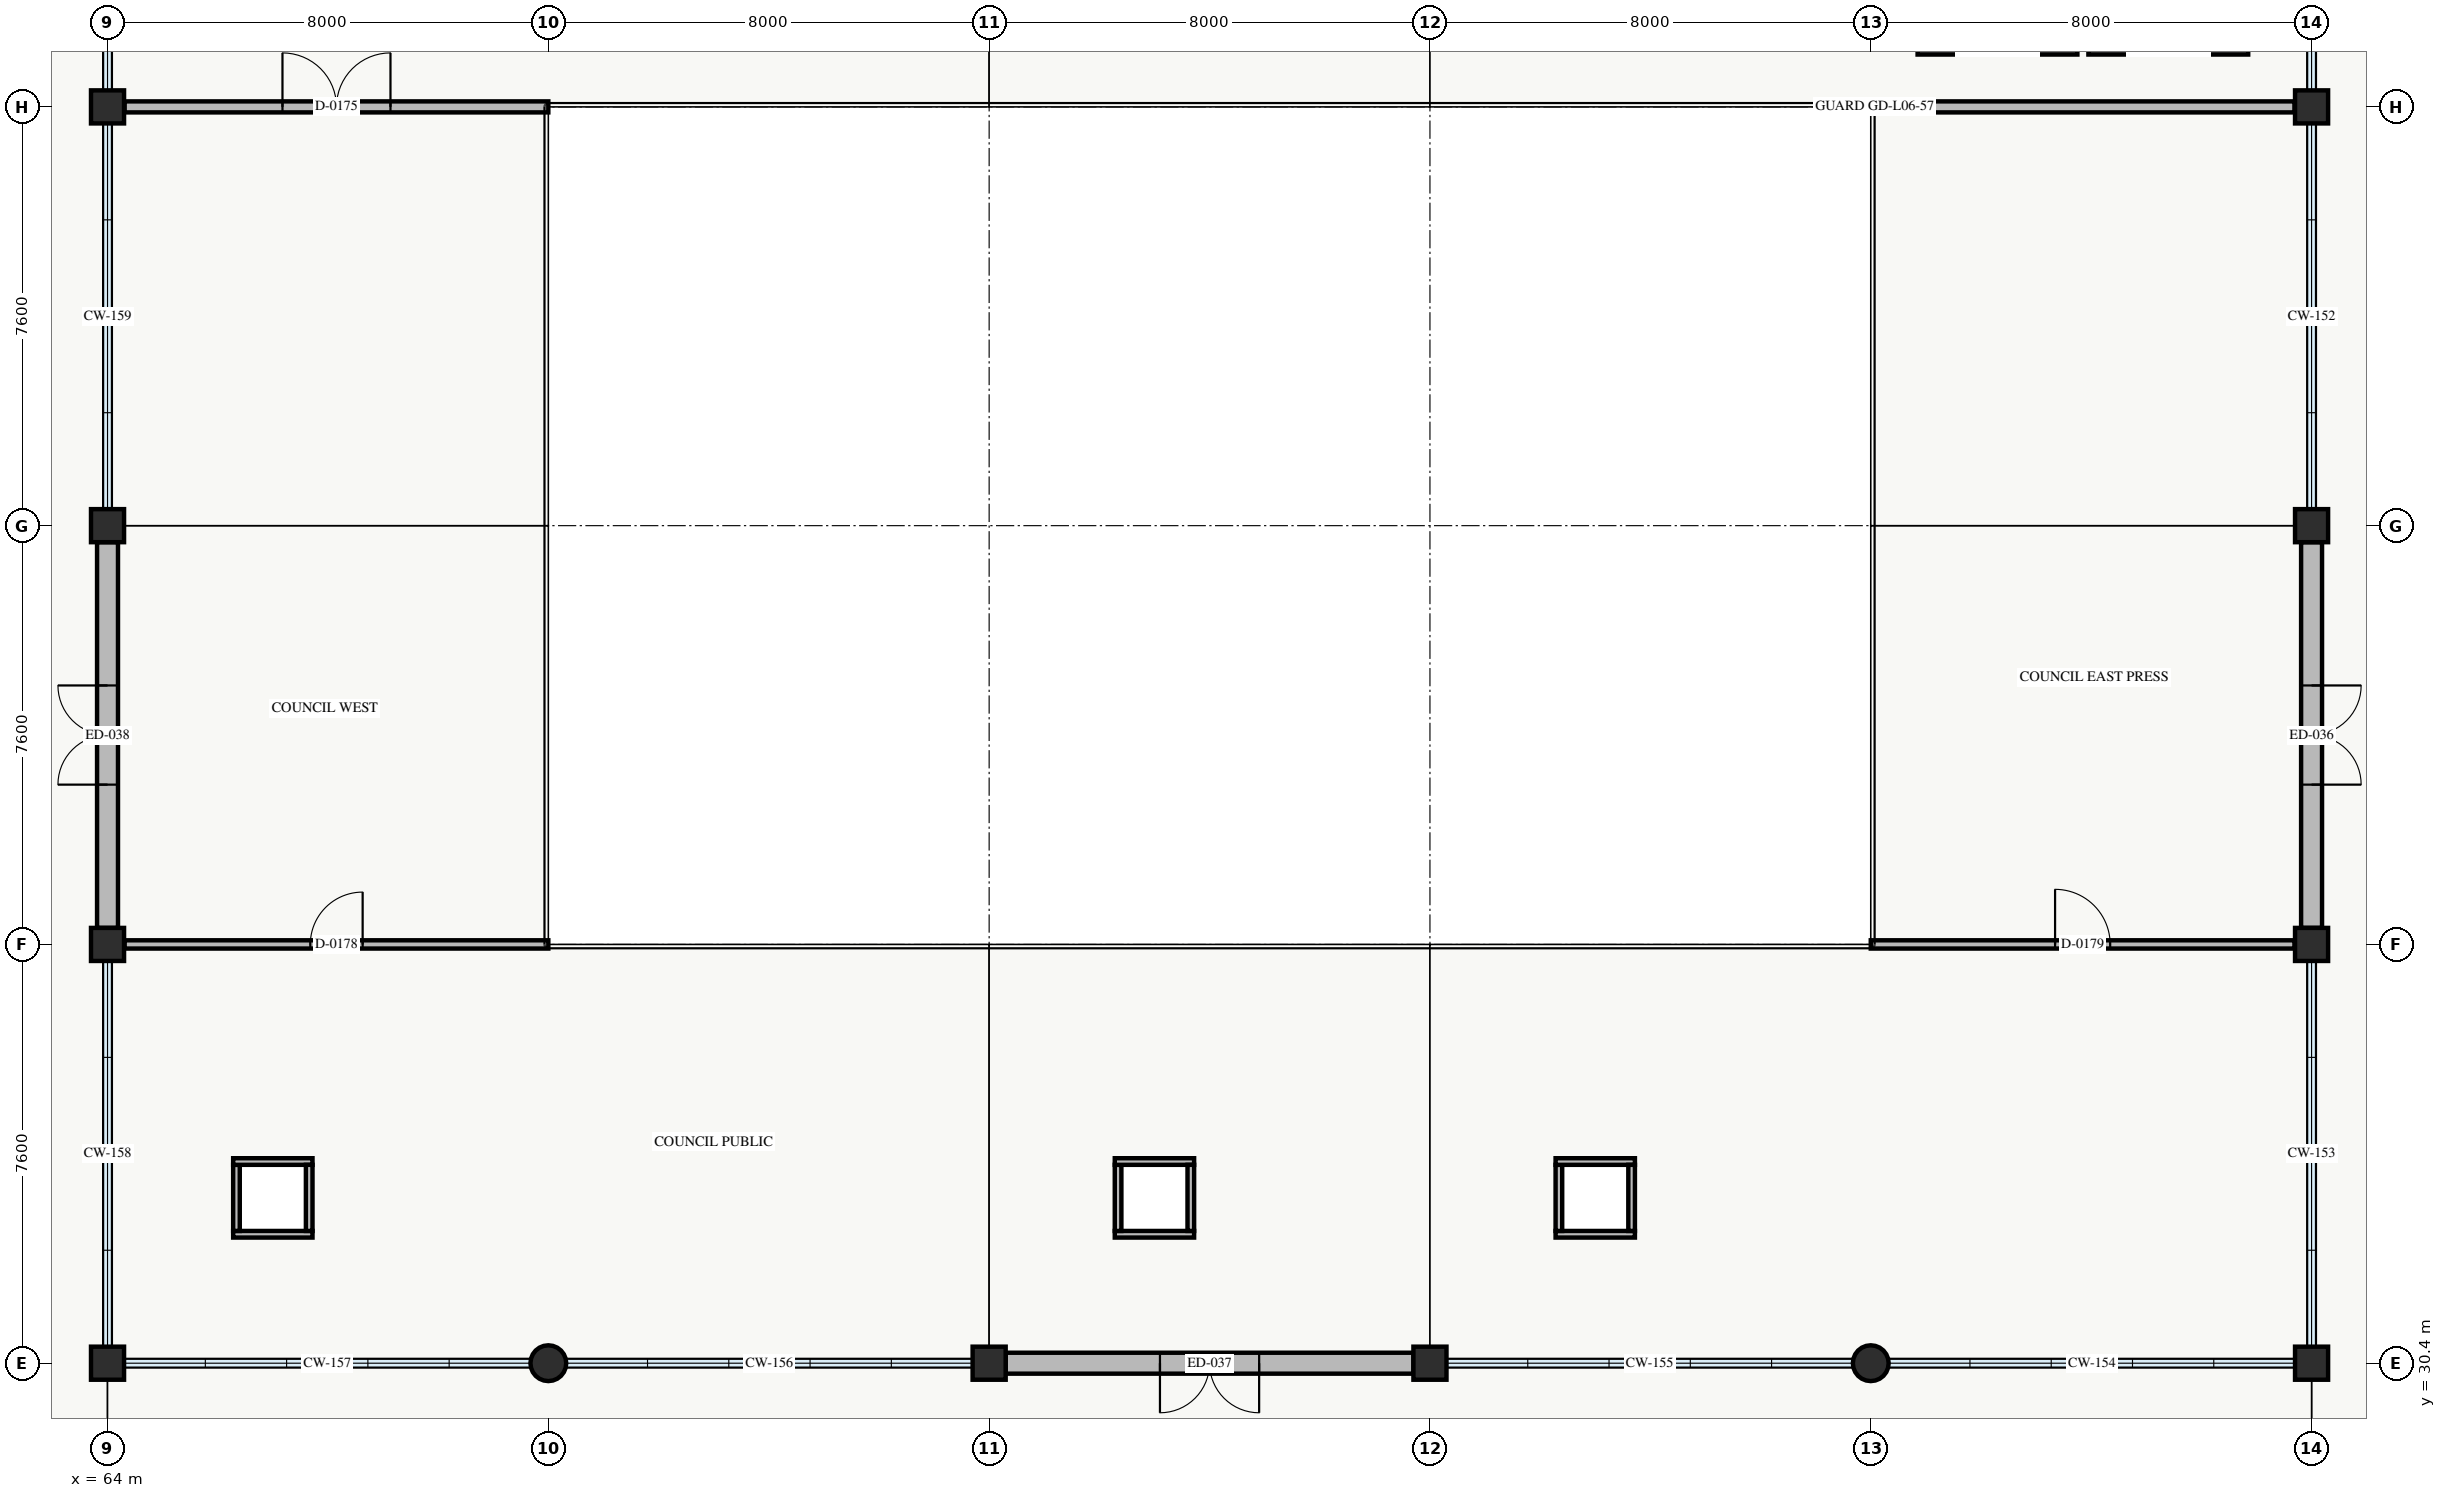
"""IFC4 building model, lengths in metres.
Left out: names, types, materials, properties, quantities, classifications, styles, units other than length and angle.
Written with IfcOpenShell. Run it as: python <this file> out.ifc"""

import sys

from ifc_helpers import new_model, si_unit, direction, frame, frame_2d, origin, origin_2d, place, context, subcontext, project, spatial, rectangle, circle, extrude, element, fill, save


model = new_model("IFC4")
c1 = context("Model", 3, precision=1e-05, world=origin(), true_north=direction((0.0, 1.0)))
c2 = subcontext(c1, "Body", "Model", "MODEL_VIEW")
j1 = project(units=[si_unit("LENGTHUNIT", "METRE"), si_unit("PLANEANGLEUNIT", "RADIAN")], contexts=[c1])
p1 = place(None, origin())
s1 = spatial("IfcSite", under=j1, at=p1, CompositionType="ELEMENT")
p2 = place(p1, origin())
s2 = spatial("IfcBuilding", under=s1, at=p2, CompositionType="ELEMENT")
p3 = place(p2, frame((0.0, 0.0, 23.7)))
s3 = spatial("IfcBuildingStorey", under=s2, at=p3, CompositionType="ELEMENT", Elevation=23.7)
for number, where, z_axis, x_axis in (
    (1, (64.0, 30.4, 0.0), (0.0, 0.0, 1.0), (1.0, 0.0, 0.0)),
    (2, (64.0, 38.0, 0.0), (0.0, 0.0, 1.0), (1.0, 0.0, 0.0)),
    (3, (64.0, 45.6, 0.0), (0.0, 0.0, 1.0), (1.0, 0.0, 0.0)),
    (4, (64.0, 53.2, 0.0), (0.0, 0.0, 1.0), (1.0, 0.0, 0.0)),
):
    element("IfcColumn", number, at=place(p3, frame(where, z_axis=z_axis, x_axis=x_axis)), inside=s3, PredefinedType="COLUMN", context=c2, shape_type="SweptSolid", body=[
        extrude(rectangle(XDim=0.6, YDim=0.6, at=origin_2d()), origin(), (0.0, 0.0, 1.0), 4.8),
    ])
p4 = place(p3, frame((72.0, 30.4, 0.0), z_axis=(0.0, 0.0, 1.0), x_axis=(1.0, 0.0, 0.0)))
e5 = element("IfcColumn", 5, at=p4, inside=s3, PredefinedType="COLUMN", context=c2, shape_type="SweptSolid", body=[
    extrude(circle(Radius=0.325, at=origin_2d()), origin(), (0.0, 0.0, 1.0), 4.8),
])
for number, where, z_axis, x_axis in (
    (6, (80.0, 30.4, 0.0), (0.0, 0.0, 1.0), (1.0, 0.0, 0.0)),
    (7, (88.0, 30.4, 0.0), (0.0, 0.0, 1.0), (1.0, 0.0, 0.0)),
):
    element("IfcColumn", number, at=place(p3, frame(where, z_axis=z_axis, x_axis=x_axis)), inside=s3, PredefinedType="COLUMN", context=c2, shape_type="SweptSolid", body=[
        extrude(rectangle(XDim=0.6, YDim=0.6, at=origin_2d()), origin(), (0.0, 0.0, 1.0), 4.8),
    ])
p5 = place(p3, frame((96.0, 30.4, 0.0), z_axis=(0.0, 0.0, 1.0), x_axis=(1.0, 0.0, 0.0)))
e8 = element("IfcColumn", 8, at=p5, inside=s3, PredefinedType="COLUMN", context=c2, shape_type="SweptSolid", body=[
    extrude(circle(Radius=0.325, at=origin_2d()), origin(), (0.0, 0.0, 1.0), 4.8),
])
for number, where, z_axis, x_axis in (
    (9, (104.0, 30.4, 0.0), (0.0, 0.0, 1.0), (1.0, 0.0, 0.0)),
    (10, (104.0, 38.0, 0.0), (0.0, 0.0, 1.0), (1.0, 0.0, 0.0)),
    (11, (104.0, 45.6, 0.0), (0.0, 0.0, 1.0), (1.0, 0.0, 0.0)),
    (12, (104.0, 53.2, 0.0), (0.0, 0.0, 1.0), (1.0, 0.0, 0.0)),
):
    element("IfcColumn", number, at=place(p3, frame(where, z_axis=z_axis, x_axis=x_axis)), inside=s3, PredefinedType="COLUMN", context=c2, shape_type="SweptSolid", body=[
        extrude(rectangle(XDim=0.6, YDim=0.6, at=origin_2d()), origin(), (0.0, 0.0, 1.0), 4.8),
    ])
p6 = place(p3, frame((104.0, 45.3, 0.0), z_axis=(0.0, 0.0, 1.0), x_axis=(0.0, -1.0, 0.0)))
e13 = element("IfcWall", 13, at=p6, inside=s3, PredefinedType="STANDARD", context=c2, shape_type="SweptSolid", body=[
    extrude(rectangle(XDim=7.0, YDim=0.38, at=frame_2d((3.5, 0.0))), origin(), (0.0, 0.0, 1.0), 4.03),
])
p7 = place(p6, frame((2.6, 0.0, 0.0)))
e14 = element("IfcOpeningElement", 14, at=p7, cuts=e13, PredefinedType="OPENING", context=c2, shape_type="SweptSolid", body=[
    extrude(rectangle(XDim=1.8, YDim=2.4, at=frame_2d((0.9, 1.2))), frame((0.0, 0.2, 0.0), z_axis=(0.0, -1.0, 0.0), x_axis=(1.0, 0.0, 0.0)), (0.0, 0.0, 1.0), 0.4),
])
p8 = place(p3, frame((87.7, 30.4, 0.0), z_axis=(0.0, 0.0, 1.0), x_axis=(-1.0, 0.0, 0.0)))
e15 = element("IfcWall", 15, at=p8, inside=s3, PredefinedType="STANDARD", context=c2, shape_type="SweptSolid", body=[
    extrude(rectangle(XDim=7.4, YDim=0.38, at=frame_2d((3.7, 0.0))), origin(), (0.0, 0.0, 1.0), 3.98),
])
p9 = place(p8, frame((2.8, 0.0, 0.0)))
e16 = element("IfcOpeningElement", 16, at=p9, cuts=e15, PredefinedType="OPENING", context=c2, shape_type="SweptSolid", body=[
    extrude(rectangle(XDim=1.8, YDim=2.4, at=frame_2d((0.9, 1.2))), frame((0.0, 0.2, 0.0), z_axis=(0.0, -1.0, 0.0), x_axis=(1.0, 0.0, 0.0)), (0.0, 0.0, 1.0), 0.4),
])
p10 = place(p3, frame((64.0, 38.3, 0.0), z_axis=(0.0, 0.0, 1.0), x_axis=(0.0, 1.0, 0.0)))
e17 = element("IfcWall", 17, at=p10, inside=s3, PredefinedType="STANDARD", context=c2, shape_type="SweptSolid", body=[
    extrude(rectangle(XDim=7.0, YDim=0.38, at=frame_2d((3.5, 0.0))), origin(), (0.0, 0.0, 1.0), 4.03),
])
p11 = place(p10, frame((2.6, 0.0, 0.0)))
e18 = element("IfcOpeningElement", 18, at=p11, cuts=e17, PredefinedType="OPENING", context=c2, shape_type="SweptSolid", body=[
    extrude(rectangle(XDim=1.8, YDim=2.4, at=frame_2d((0.9, 1.2))), frame((0.0, 0.2, 0.0), z_axis=(0.0, -1.0, 0.0), x_axis=(1.0, 0.0, 0.0)), (0.0, 0.0, 1.0), 0.4),
])
p12 = place(p3, frame((99.75, 54.275, 0.0), z_axis=(0.0, 0.0, 1.0), x_axis=(-1.0, 0.0, 0.0)))
e19 = element("IfcWall", 19, at=p12, inside=s3, PredefinedType="SHEAR", context=c2, shape_type="SweptSolid", body=[
    extrude(rectangle(XDim=2.9, YDim=0.25, at=frame_2d((1.45, 0.0))), origin(), (0.0, 0.0, 1.0), 4.58),
])
p13 = place(p12, frame((0.9, 0.0, 0.0)))
e20 = element("IfcOpeningElement", 20, at=p13, cuts=e19, PredefinedType="OPENING", context=c2, shape_type="SweptSolid", body=[
    extrude(rectangle(XDim=1.1, YDim=2.15, at=frame_2d((0.55, 1.075))), frame((0.0, 0.135, 0.0), z_axis=(0.0, -1.0, 0.0), x_axis=(1.0, 0.0, 0.0)), (0.0, 0.0, 1.0), 0.27),
])
p14 = place(p3, frame((102.85, 54.275, 0.0), z_axis=(0.0, 0.0, 1.0), x_axis=(-1.0, 0.0, 0.0)))
e21 = element("IfcWall", 21, at=p14, inside=s3, PredefinedType="SHEAR", context=c2, shape_type="SweptSolid", body=[
    extrude(rectangle(XDim=2.9, YDim=0.25, at=frame_2d((1.45, 0.0))), origin(), (0.0, 0.0, 1.0), 4.58),
])
p15 = place(p14, frame((0.9, 0.0, 0.0)))
e22 = element("IfcOpeningElement", 22, at=p15, cuts=e21, PredefinedType="OPENING", context=c2, shape_type="SweptSolid", body=[
    extrude(rectangle(XDim=1.1, YDim=2.15, at=frame_2d((0.55, 1.075))), frame((0.0, 0.135, 0.0), z_axis=(0.0, -1.0, 0.0), x_axis=(1.0, 0.0, 0.0)), (0.0, 0.0, 1.0), 0.27),
])
p16 = place(p3, frame((67.72, 32.74, 0.0), z_axis=(0.0, 0.0, 1.0), x_axis=(-1.0, 0.0, 0.0)))
e23 = element("IfcWall", 23, at=p16, inside=s3, PredefinedType="PARTITIONING", context=c2, shape_type="SweptSolid", body=[
    extrude(rectangle(XDim=1.44, YDim=0.12, at=frame_2d((0.72, 0.0))), origin(), (0.0, 0.0, 1.0), 4.58),
])
p17 = place(p3, frame((66.34, 32.8, 0.0), z_axis=(0.0, 0.0, 1.0), x_axis=(0.0, 1.0, 0.0)))
e24 = element("IfcWall", 24, at=p17, inside=s3, PredefinedType="PARTITIONING", context=c2, shape_type="SweptSolid", body=[
    extrude(rectangle(XDim=1.2, YDim=0.12, at=frame_2d((0.6, 0.0))), origin(), (0.0, 0.0, 1.0), 4.58),
])
p18 = place(p3, frame((66.28, 34.06, 0.0), z_axis=(0.0, 0.0, 1.0), x_axis=(1.0, 0.0, 0.0)))
e25 = element("IfcWall", 25, at=p18, inside=s3, PredefinedType="PARTITIONING", context=c2, shape_type="SweptSolid", body=[
    extrude(rectangle(XDim=1.44, YDim=0.12, at=frame_2d((0.72, 0.0))), origin(), (0.0, 0.0, 1.0), 4.58),
])
p19 = place(p3, frame((67.66, 34.0, 0.0), z_axis=(0.0, 0.0, 1.0), x_axis=(0.0, -1.0, 0.0)))
e26 = element("IfcWall", 26, at=p19, inside=s3, PredefinedType="PARTITIONING", context=c2, shape_type="SweptSolid", body=[
    extrude(rectangle(XDim=1.2, YDim=0.12, at=frame_2d((0.6, 0.0))), origin(), (0.0, 0.0, 1.0), 4.58),
])
p20 = place(p3, frame((83.72, 32.74, 0.0), z_axis=(0.0, 0.0, 1.0), x_axis=(-1.0, 0.0, 0.0)))
e27 = element("IfcWall", 27, at=p20, inside=s3, PredefinedType="PARTITIONING", context=c2, shape_type="SweptSolid", body=[
    extrude(rectangle(XDim=1.44, YDim=0.12, at=frame_2d((0.72, 0.0))), origin(), (0.0, 0.0, 1.0), 4.58),
])
p21 = place(p3, frame((82.34, 32.8, 0.0), z_axis=(0.0, 0.0, 1.0), x_axis=(0.0, 1.0, 0.0)))
e28 = element("IfcWall", 28, at=p21, inside=s3, PredefinedType="PARTITIONING", context=c2, shape_type="SweptSolid", body=[
    extrude(rectangle(XDim=1.2, YDim=0.12, at=frame_2d((0.6, 0.0))), origin(), (0.0, 0.0, 1.0), 4.58),
])
p22 = place(p3, frame((82.28, 34.06, 0.0), z_axis=(0.0, 0.0, 1.0), x_axis=(1.0, 0.0, 0.0)))
e29 = element("IfcWall", 29, at=p22, inside=s3, PredefinedType="PARTITIONING", context=c2, shape_type="SweptSolid", body=[
    extrude(rectangle(XDim=1.44, YDim=0.12, at=frame_2d((0.72, 0.0))), origin(), (0.0, 0.0, 1.0), 4.58),
])
p23 = place(p3, frame((83.66, 34.0, 0.0), z_axis=(0.0, 0.0, 1.0), x_axis=(0.0, -1.0, 0.0)))
e30 = element("IfcWall", 30, at=p23, inside=s3, PredefinedType="PARTITIONING", context=c2, shape_type="SweptSolid", body=[
    extrude(rectangle(XDim=1.2, YDim=0.12, at=frame_2d((0.6, 0.0))), origin(), (0.0, 0.0, 1.0), 4.58),
])
p24 = place(p3, frame((91.72, 32.74, 0.0), z_axis=(0.0, 0.0, 1.0), x_axis=(-1.0, 0.0, 0.0)))
e31 = element("IfcWall", 31, at=p24, inside=s3, PredefinedType="PARTITIONING", context=c2, shape_type="SweptSolid", body=[
    extrude(rectangle(XDim=1.44, YDim=0.12, at=frame_2d((0.72, 0.0))), origin(), (0.0, 0.0, 1.0), 4.58),
])
p25 = place(p3, frame((90.34, 32.8, 0.0), z_axis=(0.0, 0.0, 1.0), x_axis=(0.0, 1.0, 0.0)))
e32 = element("IfcWall", 32, at=p25, inside=s3, PredefinedType="PARTITIONING", context=c2, shape_type="SweptSolid", body=[
    extrude(rectangle(XDim=1.2, YDim=0.12, at=frame_2d((0.6, 0.0))), origin(), (0.0, 0.0, 1.0), 4.58),
])
p26 = place(p3, frame((90.28, 34.06, 0.0), z_axis=(0.0, 0.0, 1.0), x_axis=(1.0, 0.0, 0.0)))
e33 = element("IfcWall", 33, at=p26, inside=s3, PredefinedType="PARTITIONING", context=c2, shape_type="SweptSolid", body=[
    extrude(rectangle(XDim=1.44, YDim=0.12, at=frame_2d((0.72, 0.0))), origin(), (0.0, 0.0, 1.0), 4.58),
])
p27 = place(p3, frame((91.66, 34.0, 0.0), z_axis=(0.0, 0.0, 1.0), x_axis=(0.0, -1.0, 0.0)))
e34 = element("IfcWall", 34, at=p27, inside=s3, PredefinedType="PARTITIONING", context=c2, shape_type="SweptSolid", body=[
    extrude(rectangle(XDim=1.2, YDim=0.12, at=frame_2d((0.6, 0.0))), origin(), (0.0, 0.0, 1.0), 4.58),
])
p28 = place(p3, frame((64.31, 38.0, 0.0), z_axis=(0.0, 0.0, 1.0), x_axis=(1.0, 0.0, 0.0)))
e35 = element("IfcWall", 35, at=p28, inside=s3, PredefinedType="PARTITIONING", context=c2, shape_type="SweptSolid", body=[
    extrude(rectangle(XDim=7.69, YDim=0.15, at=frame_2d((3.845, 0.0))), origin(), (0.0, 0.0, 1.0), 4.58),
])
p29 = place(p28, frame((3.37, 0.0, 0.0)))
e36 = element("IfcOpeningElement", 36, at=p29, cuts=e35, PredefinedType="OPENING", context=c2, shape_type="SweptSolid", body=[
    extrude(rectangle(XDim=0.95, YDim=2.1, at=frame_2d((0.475, 1.05))), frame((0.0, 0.085, 0.0), z_axis=(0.0, -1.0, 0.0), x_axis=(1.0, 0.0, 0.0)), (0.0, 0.0, 1.0), 0.17),
])
p30 = place(p3, frame((96.0, 38.0, 0.0), z_axis=(0.0, 0.0, 1.0), x_axis=(1.0, 0.0, 0.0)))
e37 = element("IfcWall", 37, at=p30, inside=s3, PredefinedType="PARTITIONING", context=c2, shape_type="SweptSolid", body=[
    extrude(rectangle(XDim=7.69, YDim=0.15, at=frame_2d((3.845, 0.0))), origin(), (0.0, 0.0, 1.0), 4.58),
])
p31 = place(p30, frame((3.345, 0.0, 0.0)))
e38 = element("IfcOpeningElement", 38, at=p31, cuts=e37, PredefinedType="OPENING", context=c2, shape_type="SweptSolid", body=[
    extrude(rectangle(XDim=1.0, YDim=2.15, at=frame_2d((0.5, 1.075))), frame((0.0, 0.085, 0.0), z_axis=(0.0, -1.0, 0.0), x_axis=(1.0, 0.0, 0.0)), (0.0, 0.0, 1.0), 0.17),
])
p32 = place(p3, frame((64.31, 53.2, 0.0), z_axis=(0.0, 0.0, 1.0), x_axis=(1.0, 0.0, 0.0)))
e39 = element("IfcWall", 39, at=p32, inside=s3, PredefinedType="STANDARD", context=c2, shape_type="SweptSolid", body=[
    extrude(rectangle(XDim=7.69, YDim=0.2, at=frame_2d((3.845, 0.0))), origin(), (0.0, 0.0, 1.0), 4.58),
])
p33 = place(p32, frame((2.865, 0.0, 0.0)))
e40 = element("IfcOpeningElement", 40, at=p33, cuts=e39, PredefinedType="OPENING", context=c2, shape_type="SweptSolid", body=[
    extrude(rectangle(XDim=1.96, YDim=2.44, at=frame_2d((0.98, 1.22))), frame((0.0, 0.11, 0.0), z_axis=(0.0, -1.0, 0.0), x_axis=(1.0, 0.0, 0.0)), (0.0, 0.0, 1.0), 0.22),
])
p34 = place(p3, frame((96.0, 53.2, 0.0), z_axis=(0.0, 0.0, 1.0), x_axis=(1.0, 0.0, 0.0)))
e41 = element("IfcWall", 41, at=p34, inside=s3, PredefinedType="STANDARD", context=c2, shape_type="SweptSolid", body=[
    extrude(rectangle(XDim=7.69, YDim=0.2, at=frame_2d((3.845, 0.0))), origin(), (0.0, 0.0, 1.0), 4.58),
])
p35 = place(p7, origin())
e42 = element("IfcDoor", 42, at=p35, inside=s3, OperationType="DOUBLE_DOOR_SINGLE_SWING", PredefinedType="DOOR", context=c2, shape_type="SweptSolid", body=[
    extrude(rectangle(XDim=1.8, YDim=2.4, at=frame_2d((0.9, 1.2))), frame((0.0, 0.025, 0.0), z_axis=(0.0, -1.0, 0.0), x_axis=(1.0, 0.0, 0.0)), (0.0, 0.0, 1.0), 0.05),
])
fill(e14, e42)
p36 = place(p9, origin())
e43 = element("IfcDoor", 43, at=p36, inside=s3, OperationType="DOUBLE_DOOR_SINGLE_SWING", PredefinedType="DOOR", context=c2, shape_type="SweptSolid", body=[
    extrude(rectangle(XDim=1.8, YDim=2.4, at=frame_2d((0.9, 1.2))), frame((0.0, 0.025, 0.0), z_axis=(0.0, -1.0, 0.0), x_axis=(1.0, 0.0, 0.0)), (0.0, 0.0, 1.0), 0.05),
])
fill(e16, e43)
p37 = place(p11, origin())
e44 = element("IfcDoor", 44, at=p37, inside=s3, OperationType="DOUBLE_DOOR_SINGLE_SWING", PredefinedType="DOOR", context=c2, shape_type="SweptSolid", body=[
    extrude(rectangle(XDim=1.8, YDim=2.4, at=frame_2d((0.9, 1.2))), frame((0.0, 0.025, 0.0), z_axis=(0.0, -1.0, 0.0), x_axis=(1.0, 0.0, 0.0)), (0.0, 0.0, 1.0), 0.05),
])
fill(e18, e44)
p38 = place(p33, origin())
e45 = element("IfcDoor", 45, at=p38, inside=s3, OperationType="DOUBLE_DOOR_SINGLE_SWING", PredefinedType="DOOR", context=c2, shape_type="SweptSolid", body=[
    extrude(rectangle(XDim=1.96, YDim=2.44, at=frame_2d((0.98, 1.22))), frame((0.0, 0.025, 0.0), z_axis=(0.0, -1.0, 0.0), x_axis=(1.0, 0.0, 0.0)), (0.0, 0.0, 1.0), 0.05),
])
fill(e40, e45)
p39 = place(p29, origin())
e46 = element("IfcDoor", 46, at=p39, inside=s3, OperationType="SINGLE_SWING_RIGHT", PredefinedType="DOOR", context=c2, shape_type="SweptSolid", body=[
    extrude(rectangle(XDim=0.95, YDim=2.1, at=frame_2d((0.475, 1.05))), frame((0.0, 0.025, 0.0), z_axis=(0.0, -1.0, 0.0), x_axis=(1.0, 0.0, 0.0)), (0.0, 0.0, 1.0), 0.05),
])
fill(e36, e46)
p40 = place(p31, origin())
e47 = element("IfcDoor", 47, at=p40, inside=s3, OperationType="SINGLE_SWING_LEFT", PredefinedType="DOOR", context=c2, shape_type="SweptSolid", body=[
    extrude(rectangle(XDim=1.0, YDim=2.15, at=frame_2d((0.5, 1.075))), frame((0.0, 0.025, 0.0), z_axis=(0.0, -1.0, 0.0), x_axis=(1.0, 0.0, 0.0)), (0.0, 0.0, 1.0), 0.05),
])
fill(e38, e47)
save(model, sys.argv[1])
